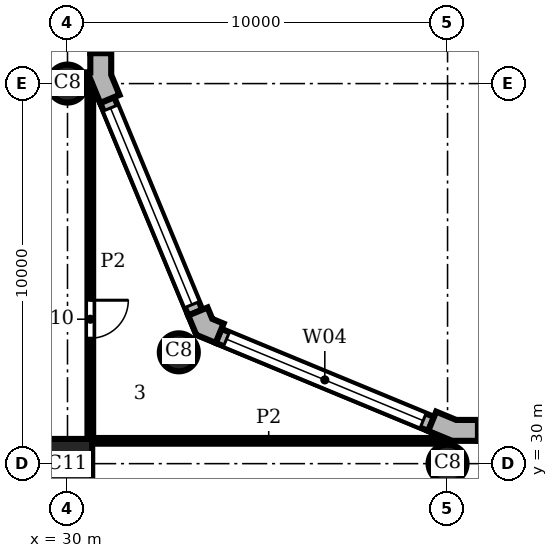
"""IFC4 building model, lengths in metres.
Left out: names, types, materials, properties, quantities, classifications, styles, units other than length and angle.
Written with IfcOpenShell. Run it as: python <this file> out.ifc"""

import sys

from ifc_helpers import new_model, si_unit, direction, frame, frame_2d, origin, origin_2d, place, context, subcontext, project, spatial, polyline, rectangle, circle, outline, extrude, element, fill, save


model = new_model("IFC4")
c1 = context("Model", 3, precision=1e-05, world=origin(), true_north=direction((0.0, 1.0)))
c2 = subcontext(c1, "Body", "Model", "MODEL_VIEW")
j1 = project(units=[si_unit("LENGTHUNIT", "METRE"), si_unit("PLANEANGLEUNIT", "RADIAN")], contexts=[c1])
p1 = place(None, origin())
s1 = spatial("IfcSite", under=j1, at=p1, CompositionType="ELEMENT")
p2 = place(p1, origin())
s2 = spatial("IfcBuilding", under=s1, at=p2, CompositionType="ELEMENT")
p3 = place(p2, frame((0.0, 0.0, 143.4)))
s3 = spatial("IfcBuildingStorey", under=s2, at=p3, CompositionType="ELEMENT", Elevation=143.4)
for number, where, z_axis, x_axis in (
    (1, (40.0, 30.0, 0.0), (0.0, 0.0, 1.0), (1.0, 0.0, 0.0)),
    (2, (32.929, 32.929, 0.0), (0.0, 0.0, 1.0), (1.0, 0.0, 0.0)),
    (3, (30.0, 40.0, 0.0), (0.0, 0.0, 1.0), (1.0, 0.0, 0.0)),
):
    element("IfcColumn", number, at=place(p3, frame(where, z_axis=z_axis, x_axis=x_axis)), inside=s3, PredefinedType="COLUMN", context=c2, shape_type="SweptSolid", body=[
        extrude(circle(Radius=0.5, at=origin_2d()), origin(), (0.0, 0.0, 1.0), 3.9),
    ])
p4 = place(p3, frame((30.0, 30.0, 0.0), z_axis=(0.0, 0.0, 1.0), x_axis=(1.0, 0.0, 0.0)))
e4 = element("IfcColumn", 4, at=p4, inside=s3, PredefinedType="COLUMN", context=c2, shape_type="SweptSolid", body=[
    extrude(rectangle(XDim=1.3, YDim=1.3, at=origin_2d()), origin(), (0.0, 0.0, 1.0), 3.9),
])
p5 = place(p3, origin())
e5 = element("IfcWall", 5, at=p5, inside=s3, PredefinedType="SOLIDWALL", context=c2, shape_type="SweptSolid", body=[
    extrude(outline(polyline([(40.8, 31.0), (40.8, 31.15), (40.229, 31.15), (39.701, 31.369), (39.644, 31.23), (39.49, 30.861), (40.119, 30.6), (40.8, 30.6), (40.8, 31.0)])), origin(), (0.0, 0.0, 1.0), 3.9),
])
e6 = element("IfcWall", 6, at=p5, inside=s3, PredefinedType="SOLIDWALL", context=c2, shape_type="SweptSolid", body=[
    extrude(outline(polyline([(34.051, 33.547), (34.108, 33.685), (33.809, 33.809), (33.685, 34.108), (33.547, 34.051), (33.177, 33.898), (33.388, 33.388), (33.898, 33.177), (34.051, 33.547)])), origin(), (0.0, 0.0, 1.0), 3.9),
])
e7 = element("IfcWall", 7, at=p5, inside=s3, PredefinedType="SOLIDWALL", context=c2, shape_type="SweptSolid", body=[
    extrude(outline(polyline([(30.62, 39.995), (30.62, 40.071), (30.861, 39.49), (31.23, 39.644), (31.369, 39.701), (31.15, 40.229), (31.15, 40.8), (31.0, 40.8), (30.6, 40.8), (30.6, 40.295), (30.5, 40.295), (30.5, 39.995), (30.62, 39.995)])), origin(), (0.0, 0.0, 1.0), 3.9),
])
p6 = place(p3, frame((59.2, 30.8, 0.0), z_axis=(0.0, 0.0, 1.0), x_axis=(-1.0, 0.0, 0.0)))
e8 = element("IfcWall", 8, at=p6, inside=s3, PredefinedType="SOLIDWALL", context=c2, shape_type="SweptSolid", body=[
    extrude(rectangle(XDim=18.4, YDim=0.4, at=frame_2d((9.2, 0.0))), origin(), (0.0, 0.0, 1.0), 3.9),
])
p7 = place(p6, frame((0.2, 0.0, 0.9)))
e9 = element("IfcOpeningElement", 9, at=p7, cuts=e8, PredefinedType="OPENING", context=c2, shape_type="SweptSolid", body=[
    extrude(rectangle(XDim=8.0, YDim=2.35, at=frame_2d((4.0, 1.175))), frame((0.0, 0.21, 0.0), z_axis=(0.0, -1.0, 0.0), x_axis=(1.0, 0.0, 0.0)), (0.0, 0.0, 1.0), 0.42),
])
p8 = place(p6, frame((10.2, 0.0, 0.9)))
e10 = element("IfcOpeningElement", 10, at=p8, cuts=e8, PredefinedType="OPENING", context=c2, shape_type="SweptSolid", body=[
    extrude(rectangle(XDim=8.0, YDim=2.35, at=frame_2d((4.0, 1.175))), frame((0.0, 0.21, 0.0), z_axis=(0.0, -1.0, 0.0), x_axis=(1.0, 0.0, 0.0)), (0.0, 0.0, 1.0), 0.42),
])
p9 = place(p3, frame((39.567, 31.045, 0.0), z_axis=(0.0, 0.0, 1.0), x_axis=(-0.923891000409, 0.382655745237, 0.0)))
e11 = element("IfcWall", 11, at=p9, inside=s3, PredefinedType="SOLIDWALL", context=c2, shape_type="SweptSolid", body=[
    extrude(rectangle(XDim=6.053, YDim=0.4, at=frame_2d((3.027, 0.0))), origin(), (0.0, 0.0, 1.0), 3.9),
])
p10 = place(p9, frame((0.227, 0.0, 0.9)))
e12 = element("IfcOpeningElement", 12, at=p10, cuts=e11, PredefinedType="OPENING", context=c2, shape_type="SweptSolid", body=[
    extrude(rectangle(XDim=5.6, YDim=2.35, at=frame_2d((2.8, 1.175))), frame((0.0, 0.21, 0.0), z_axis=(0.0, -1.0, 0.0), x_axis=(1.0, 0.0, 0.0)), (0.0, 0.0, 1.0), 0.42),
])
p11 = place(p3, frame((33.362, 33.974, 0.0), z_axis=(0.0, 0.0, 1.0), x_axis=(-0.382655745237, 0.923891000409, 0.0)))
e13 = element("IfcWall", 13, at=p11, inside=s3, PredefinedType="SOLIDWALL", context=c2, shape_type="SweptSolid", body=[
    extrude(rectangle(XDim=6.053, YDim=0.4, at=frame_2d((3.027, 0.0))), origin(), (0.0, 0.0, 1.0), 3.9),
])
p12 = place(p11, frame((0.227, 0.0, 0.9)))
e14 = element("IfcOpeningElement", 14, at=p12, cuts=e13, PredefinedType="OPENING", context=c2, shape_type="SweptSolid", body=[
    extrude(rectangle(XDim=5.6, YDim=2.35, at=frame_2d((2.8, 1.175))), frame((0.0, 0.21, 0.0), z_axis=(0.0, -1.0, 0.0), x_axis=(1.0, 0.0, 0.0)), (0.0, 0.0, 1.0), 0.42),
])
p13 = place(p3, frame((30.8, 40.8, 0.0), z_axis=(0.0, 0.0, 1.0), x_axis=(0.0, 1.0, 0.0)))
e15 = element("IfcWall", 15, at=p13, inside=s3, PredefinedType="SOLIDWALL", context=c2, shape_type="SweptSolid", body=[
    extrude(rectangle(XDim=18.4, YDim=0.4, at=frame_2d((9.2, 0.0))), origin(), (0.0, 0.0, 1.0), 3.9),
])
p14 = place(p13, frame((0.2, 0.0, 0.9)))
e16 = element("IfcOpeningElement", 16, at=p14, cuts=e15, PredefinedType="OPENING", context=c2, shape_type="SweptSolid", body=[
    extrude(rectangle(XDim=8.0, YDim=2.35, at=frame_2d((4.0, 1.175))), frame((0.0, 0.21, 0.0), z_axis=(0.0, -1.0, 0.0), x_axis=(1.0, 0.0, 0.0)), (0.0, 0.0, 1.0), 0.42),
])
p15 = place(p13, frame((10.2, 0.0, 0.9)))
e17 = element("IfcOpeningElement", 17, at=p15, cuts=e15, PredefinedType="OPENING", context=c2, shape_type="SweptSolid", body=[
    extrude(rectangle(XDim=8.0, YDim=2.35, at=frame_2d((4.0, 1.175))), frame((0.0, 0.21, 0.0), z_axis=(0.0, -1.0, 0.0), x_axis=(1.0, 0.0, 0.0)), (0.0, 0.0, 1.0), 0.42),
])
p16 = place(p3, frame((30.6, 30.65, 0.0), z_axis=(0.0, 0.0, 1.0), x_axis=(0.0, 1.0, 0.0)))
e18 = element("IfcWall", 18, at=p16, inside=s3, PredefinedType="PARTITIONING", context=c2, shape_type="SweptSolid", body=[
    extrude(rectangle(XDim=9.288, YDim=0.15, at=frame_2d((4.644, 0.0))), origin(), (0.0, 0.0, 1.0), 3.58),
])
p17 = place(p16, frame((2.65, 0.0, 0.0)))
e19 = element("IfcOpeningElement", 19, at=p17, cuts=e18, PredefinedType="OPENING", context=c2, shape_type="SweptSolid", body=[
    extrude(rectangle(XDim=1.0, YDim=2.1, at=frame_2d((0.5, 1.05))), frame((0.0, 0.085, 0.0), z_axis=(0.0, -1.0, 0.0), x_axis=(1.0, 0.0, 0.0)), (0.0, 0.0, 1.0), 0.17),
])
p18 = place(p3, frame((30.65, 30.6, 0.0), z_axis=(0.0, 0.0, 1.0), x_axis=(1.0, 0.0, 0.0)))
e20 = element("IfcWall", 20, at=p18, inside=s3, PredefinedType="PARTITIONING", context=c2, shape_type="SweptSolid", body=[
    extrude(rectangle(XDim=9.288, YDim=0.15, at=frame_2d((4.644, 0.0))), origin(), (0.0, 0.0, 1.0), 3.58),
])
p19 = place(p10, origin())
e21 = element("IfcWindow", 21, at=p19, inside=s3, PartitioningType="SINGLE_PANEL", PredefinedType="WINDOW", context=c2, shape_type="SweptSolid", body=[
    extrude(rectangle(XDim=5.6, YDim=2.35, at=frame_2d((2.8, 1.175))), frame((0.0, 0.16, 0.0), z_axis=(0.0, -1.0, 0.0), x_axis=(1.0, 0.0, 0.0)), (0.0, 0.0, 1.0), 0.06),
])
fill(e12, e21)
p20 = place(p12, origin())
e22 = element("IfcWindow", 22, at=p20, inside=s3, PartitioningType="SINGLE_PANEL", PredefinedType="WINDOW", context=c2, shape_type="SweptSolid", body=[
    extrude(rectangle(XDim=5.6, YDim=2.35, at=frame_2d((2.8, 1.175))), frame((0.0, 0.16, 0.0), z_axis=(0.0, -1.0, 0.0), x_axis=(1.0, 0.0, 0.0)), (0.0, 0.0, 1.0), 0.06),
])
fill(e14, e22)
p21 = place(p17, frame((1.0, 0.0, 0.0), z_axis=(0.0, 0.0, 1.0), x_axis=(-1.0, 0.0, 0.0)))
e23 = element("IfcDoor", 23, at=p21, inside=s3, OperationType="SINGLE_SWING_LEFT", PredefinedType="DOOR", context=c2, shape_type="SweptSolid", body=[
    extrude(rectangle(XDim=1.0, YDim=2.1, at=frame_2d((0.5, 1.05))), frame((0.0, 0.025, 0.0), z_axis=(0.0, -1.0, 0.0), x_axis=(1.0, 0.0, 0.0)), (0.0, 0.0, 1.0), 0.05),
])
fill(e19, e23)
save(model, sys.argv[1])
